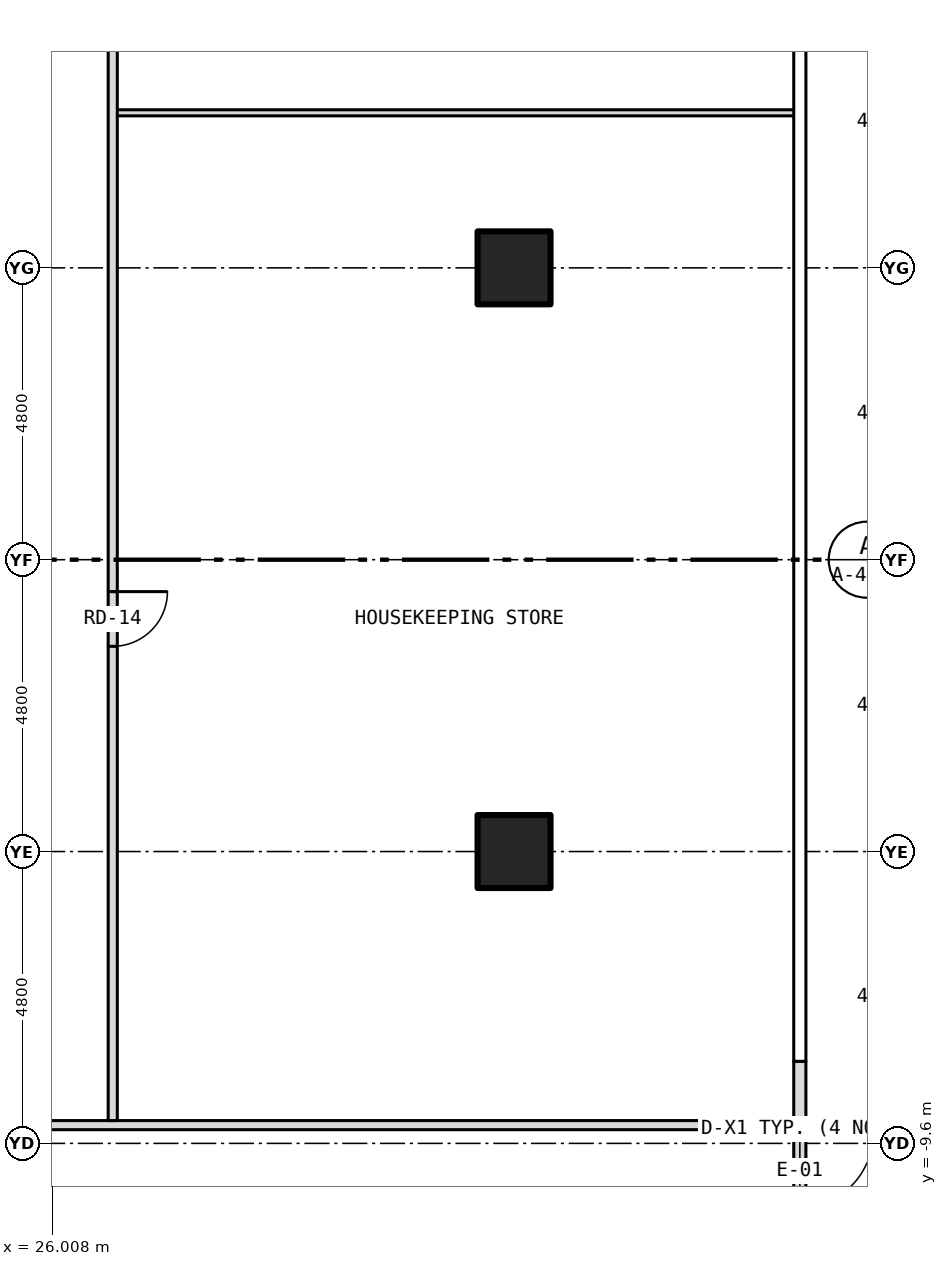
"""IFC4 building model, lengths in metres.
Left out: names, types, materials, properties, quantities, classifications, styles, units other than length and angle.
Written with IfcOpenShell. Run it as: python <this file> out.ifc"""

import sys

from ifc_helpers import new_model, si_unit, direction, frame, frame_2d, origin, origin_2d, place, context, subcontext, project, spatial, rectangle, hollow_rectangle, extrude, element, fill, save


model = new_model("IFC4")
c1 = context("Model", 3, precision=1e-05, world=origin(), true_north=direction((0.0, 1.0)))
c2 = subcontext(c1, "Body", "Model", "MODEL_VIEW")
j1 = project(units=[si_unit("LENGTHUNIT", "METRE"), si_unit("PLANEANGLEUNIT", "RADIAN")], contexts=[c1])
p1 = place(None, origin())
s1 = spatial("IfcSite", under=j1, at=p1, CompositionType="ELEMENT")
p2 = place(p1, origin())
s2 = spatial("IfcBuilding", under=s1, at=p2, CompositionType="ELEMENT")
p3 = place(p2, origin())
s3 = spatial("IfcBuildingStorey", under=s2, at=p3, CompositionType="ELEMENT", Elevation=0.0)
for number, where, z_axis, x_axis in (
    (1, (33.6, -4.8, -0.3), (0.0, 0.0, 1.0), (1.0, 0.0, 0.0)),
    (2, (33.6, 4.8, -0.3), (0.0, 0.0, 1.0), (1.0, 0.0, 0.0)),
):
    element("IfcColumn", number, at=place(p3, frame(where, z_axis=z_axis, x_axis=x_axis)), inside=s3, PredefinedType="COLUMN", context=c2, shape_type="SweptSolid", body=[
        extrude(hollow_rectangle(XDim=1.2, YDim=1.2, WallThickness=0.07, at=origin_2d()), origin(), (0.0, 0.0, 1.0), 7.55),
    ])
p4 = place(p3, frame((38.3, -8.25, 0.0), z_axis=(0.0, 0.0, 1.0), x_axis=(0.0, -1.0, 0.0)))
e3 = element("IfcWall", 3, at=p4, inside=s3, PredefinedType="SOLIDWALL", context=c2, shape_type="SweptSolid", body=[
    extrude(rectangle(XDim=3.6, YDim=0.2, at=frame_2d((1.8, 0.0))), origin(), (0.0, 0.0, 1.0), 6.628),
])
p5 = place(p4, frame((1.2, 0.0, 0.0)))
e4 = element("IfcOpeningElement", 4, at=p5, cuts=e3, PredefinedType="OPENING", context=c2, shape_type="SweptSolid", body=[
    extrude(rectangle(XDim=1.2, YDim=2.4, at=frame_2d((0.6, 1.2))), frame((0.0, 0.112, 0.0), z_axis=(0.0, -1.0, 0.0), x_axis=(1.0, 0.0, 0.0)), (0.0, 0.0, 1.0), 0.224),
])
p6 = place(p3, frame((24.12, -9.3, 0.0), z_axis=(0.0, 0.0, 1.0), x_axis=(1.0, 0.0, 0.0)))
e5 = element("IfcWall", 5, at=p6, inside=s3, PredefinedType="PARTITIONING", context=c2, shape_type="SweptSolid", body=[
    extrude(rectangle(XDim=12.78, YDim=0.15, at=frame_2d((6.39, 0.0))), origin(), (0.0, 0.0, 1.0), 7.25),
])
p7 = place(p3, frame((27.0, 7.35, 0.0), z_axis=(0.0, 0.0, 1.0), x_axis=(1.0, 0.0, 0.0)))
e6 = element("IfcWall", 6, at=p7, inside=s3, PredefinedType="PARTITIONING", context=c2, shape_type="SweptSolid", body=[
    extrude(rectangle(XDim=11.28, YDim=0.1, at=frame_2d((5.64, 0.0))), origin(), (0.0, 0.0, 1.0), 7.25),
])
p8 = place(p3, frame((27.0, -9.225, 0.0), z_axis=(0.0, 0.0, 1.0), x_axis=(0.0, 1.0, 0.0)))
e7 = element("IfcWall", 7, at=p8, inside=s3, PredefinedType="PARTITIONING", context=c2, shape_type="SweptSolid", body=[
    extrude(rectangle(XDim=22.95, YDim=0.15, at=frame_2d((11.475, 0.0))), origin(), (0.0, 0.0, 1.0), 7.25),
])
p9 = place(p8, frame((7.8, 0.0, 0.0)))
e8 = element("IfcOpeningElement", 8, at=p9, cuts=e7, PredefinedType="OPENING", context=c2, shape_type="SweptSolid", body=[
    extrude(rectangle(XDim=0.9, YDim=2.1, at=frame_2d((0.45, 1.05))), frame((0.0, 0.087, 0.0), z_axis=(0.0, -1.0, 0.0), x_axis=(1.0, 0.0, 0.0)), (0.0, 0.0, 1.0), 0.174),
])
p10 = place(p8, frame((19.35, 0.0, 0.0)))
e9 = element("IfcOpeningElement", 9, at=p10, cuts=e7, PredefinedType="OPENING", context=c2, shape_type="SweptSolid", body=[
    extrude(rectangle(XDim=0.9, YDim=2.1, at=frame_2d((0.45, 1.05))), frame((0.0, 0.087, 0.0), z_axis=(0.0, -1.0, 0.0), x_axis=(1.0, 0.0, 0.0)), (0.0, 0.0, 1.0), 0.174),
])
p11 = place(p5, origin())
e10 = element("IfcDoor", 10, at=p11, inside=s3, OperationType="SINGLE_SWING_LEFT", PredefinedType="DOOR", context=c2, shape_type="SweptSolid", body=[
    extrude(rectangle(XDim=1.2, YDim=2.4, at=frame_2d((0.6, 1.2))), frame((0.0, 0.025, 0.0), z_axis=(0.0, -1.0, 0.0), x_axis=(1.0, 0.0, 0.0)), (0.0, 0.0, 1.0), 0.05),
])
fill(e4, e10)
p12 = place(p9, origin())
e11 = element("IfcDoor", 11, at=p12, inside=s3, OperationType="SINGLE_SWING_RIGHT", PredefinedType="DOOR", context=c2, shape_type="SweptSolid", body=[
    extrude(rectangle(XDim=0.9, YDim=2.1, at=frame_2d((0.45, 1.05))), frame((0.0, 0.025, 0.0), z_axis=(0.0, -1.0, 0.0), x_axis=(1.0, 0.0, 0.0)), (0.0, 0.0, 1.0), 0.05),
])
fill(e8, e11)
save(model, sys.argv[1])
